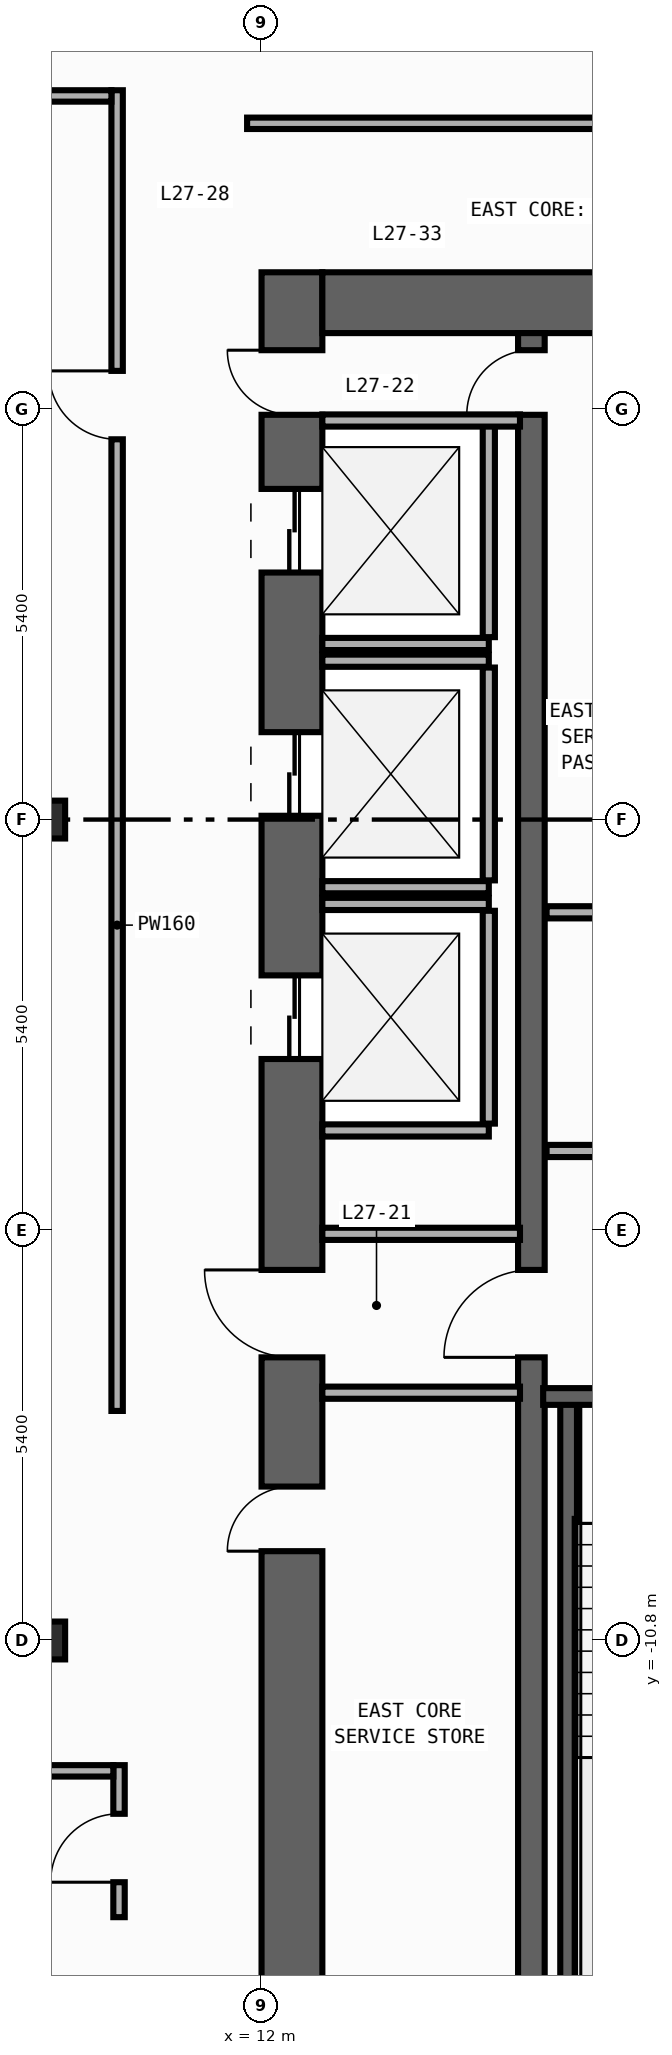
"""IFC4 building model, lengths in metres.
Left out: names, types, materials, properties, quantities, classifications, styles, units other than length and angle.
Written with IfcOpenShell. Run it as: python <this file> out.ifc"""

import sys

from ifc_helpers import new_model, si_unit, direction, frame, frame_2d, origin, origin_2d, place, context, subcontext, project, spatial, rectangle, i_section, extrude, element, fill, save


model = new_model("IFC4")
c1 = context("Model", 3, precision=1e-05, world=origin(), true_north=direction((0.0, 1.0)))
c2 = subcontext(c1, "Body", "Model", "MODEL_VIEW")
j1 = project(units=[si_unit("LENGTHUNIT", "METRE"), si_unit("PLANEANGLEUNIT", "RADIAN")], contexts=[c1])
p1 = place(None, origin())
s1 = spatial("IfcSite", under=j1, at=p1, CompositionType="ELEMENT")
p2 = place(p1, origin())
s2 = spatial("IfcBuilding", under=s1, at=p2, CompositionType="ELEMENT")
p3 = place(p2, frame((0.0, 0.0, 118.4)))
s3 = spatial("IfcBuildingStorey", under=s2, at=p3, CompositionType="ELEMENT", Elevation=118.4)
p4 = place(p3, frame((12.4, -19.8, 0.0), z_axis=(0.0, 0.0, 1.0), x_axis=(0.0, 1.0, 0.0)))
e1 = element("IfcWall", 1, at=p4, inside=s3, PredefinedType="SHEAR", context=c2, shape_type="SweptSolid", body=[
    extrude(rectangle(XDim=27.0, YDim=0.8, at=frame_2d((13.5, 0.0))), origin(), (0.0, 0.0, 1.0), 3.94),
])
p5 = place(p4, frame((23.05, 0.0, 0.0)))
e2 = element("IfcOpeningElement", 2, at=p5, cuts=e1, PredefinedType="OPENING", context=c2, shape_type="SweptSolid", body=[
    extrude(rectangle(XDim=1.1, YDim=2.2, at=frame_2d((0.55, 1.1))), frame((0.0, 0.41, 0.0), z_axis=(0.0, -1.0, 0.0), x_axis=(1.0, 0.0, 0.0)), (0.0, 0.0, 1.0), 0.82),
])
p6 = place(p4, frame((19.85, 0.0, 0.0)))
e3 = element("IfcOpeningElement", 3, at=p6, cuts=e1, PredefinedType="OPENING", context=c2, shape_type="SweptSolid", body=[
    extrude(rectangle(XDim=1.1, YDim=2.2, at=frame_2d((0.55, 1.1))), frame((0.0, 0.41, 0.0), z_axis=(0.0, -1.0, 0.0), x_axis=(1.0, 0.0, 0.0)), (0.0, 0.0, 1.0), 0.82),
])
p7 = place(p4, frame((16.65, 0.0, 0.0)))
e4 = element("IfcOpeningElement", 4, at=p7, cuts=e1, PredefinedType="OPENING", context=c2, shape_type="SweptSolid", body=[
    extrude(rectangle(XDim=1.1, YDim=2.2, at=frame_2d((0.55, 1.1))), frame((0.0, 0.41, 0.0), z_axis=(0.0, -1.0, 0.0), x_axis=(1.0, 0.0, 0.0)), (0.0, 0.0, 1.0), 0.82),
])
p8 = place(p4, frame((10.175, 0.0, 0.0)))
e5 = element("IfcOpeningElement", 5, at=p8, cuts=e1, PredefinedType="OPENING", context=c2, shape_type="SweptSolid", body=[
    extrude(rectangle(XDim=0.85, YDim=2.1, at=frame_2d((0.425, 1.05))), frame((0.0, 0.41, 0.0), z_axis=(0.0, -1.0, 0.0), x_axis=(1.0, 0.0, 0.0)), (0.0, 0.0, 1.0), 0.82),
])
p9 = place(p4, frame((12.725, 0.0, 0.0)))
e6 = element("IfcOpeningElement", 6, at=p9, cuts=e1, PredefinedType="OPENING", context=c2, shape_type="SweptSolid", body=[
    extrude(rectangle(XDim=1.15, YDim=2.2, at=frame_2d((0.575, 1.1))), frame((0.0, 0.41, 0.0), z_axis=(0.0, -1.0, 0.0), x_axis=(1.0, 0.0, 0.0)), (0.0, 0.0, 1.0), 0.82),
])
p10 = place(p4, frame((25.125, 0.0, 0.0)))
e7 = element("IfcOpeningElement", 7, at=p10, cuts=e1, PredefinedType="OPENING", context=c2, shape_type="SweptSolid", body=[
    extrude(rectangle(XDim=0.85, YDim=2.1, at=frame_2d((0.425, 1.05))), frame((0.0, 0.41, 0.0), z_axis=(0.0, -1.0, 0.0), x_axis=(1.0, 0.0, 0.0)), (0.0, 0.0, 1.0), 0.82),
])
p11 = place(p3, frame((12.8, 6.8, 0.0), z_axis=(0.0, 0.0, 1.0), x_axis=(1.0, 0.0, 0.0)))
e8 = element("IfcWall", 8, at=p11, inside=s3, PredefinedType="SHEAR", context=c2, shape_type="SweptSolid", body=[
    extrude(rectangle(XDim=6.8, YDim=0.8, at=frame_2d((3.4, 0.0))), origin(), (0.0, 0.0, 1.0), 3.94),
])
p12 = place(p3, frame((15.55, -19.0, 0.0), z_axis=(0.0, 0.0, 1.0), x_axis=(0.0, 1.0, 0.0)))
e9 = element("IfcWall", 9, at=p12, inside=s3, PredefinedType="SHEAR", context=c2, shape_type="SweptSolid", body=[
    extrude(rectangle(XDim=25.4, YDim=0.35, at=frame_2d((12.7, 0.0))), origin(), (0.0, 0.0, 1.0), 3.94),
])
p13 = place(p12, frame((11.925, 0.0, 0.0)))
e10 = element("IfcOpeningElement", 10, at=p13, cuts=e9, PredefinedType="OPENING", context=c2, shape_type="SweptSolid", body=[
    extrude(rectangle(XDim=1.15, YDim=2.2, at=frame_2d((0.575, 1.1))), frame((0.0, 0.185, 0.0), z_axis=(0.0, -1.0, 0.0), x_axis=(1.0, 0.0, 0.0)), (0.0, 0.0, 1.0), 0.37),
])
p14 = place(p12, frame((24.325, 0.0, 0.0)))
e11 = element("IfcOpeningElement", 11, at=p14, cuts=e9, PredefinedType="OPENING", context=c2, shape_type="SweptSolid", body=[
    extrude(rectangle(XDim=0.85, YDim=2.1, at=frame_2d((0.425, 1.05))), frame((0.0, 0.185, 0.0), z_axis=(0.0, -1.0, 0.0), x_axis=(1.0, 0.0, 0.0)), (0.0, 0.0, 1.0), 0.37),
])
p15 = place(p3, frame((16.04, -18.89, 0.0), z_axis=(0.0, 0.0, 1.0), x_axis=(0.0, 1.0, 0.0)))
e12 = element("IfcWall", 12, at=p15, inside=s3, PredefinedType="SHEAR", context=c2, shape_type="SweptSolid", body=[
    extrude(rectangle(XDim=11.3, YDim=0.22, at=frame_2d((5.65, 0.0))), origin(), (0.0, 0.0, 1.0), 3.94),
])
p16 = place(p3, frame((19.62, -7.59, 0.0), z_axis=(0.0, 0.0, 1.0), x_axis=(-1.0, 0.0, 0.0)))
e13 = element("IfcWall", 13, at=p16, inside=s3, PredefinedType="SHEAR", context=c2, shape_type="SweptSolid", body=[
    extrude(rectangle(XDim=3.915, YDim=0.22, at=frame_2d((1.958, 0.0))), origin(), (0.0, 0.0, 1.0), 3.94),
])
p17 = place(p16, frame((1.08, 0.0, 0.0)))
e14 = element("IfcOpeningElement", 14, at=p17, cuts=e13, PredefinedType="OPENING", context=c2, shape_type="SweptSolid", body=[
    extrude(rectangle(XDim=1.1, YDim=2.2, at=frame_2d((0.55, 1.1))), frame((0.0, 0.12, 0.0), z_axis=(0.0, -1.0, 0.0), x_axis=(1.0, 0.0, 0.0)), (0.0, 0.0, 1.0), 0.24),
])
for number, where, z_axis, x_axis in (
    (15, (9.2, -10.8, 0.0), (0.0, 0.0, 1.0), (1.0, 0.0, 0.0)),
    (16, (9.2, 0.0, 0.0), (0.0, 0.0, 1.0), (1.0, 0.0, 0.0)),
):
    element("IfcColumn", number, at=place(p3, frame(where, z_axis=z_axis, x_axis=x_axis)), inside=s3, PredefinedType="COLUMN", context=c2, shape_type="SweptSolid", body=[
        extrude(i_section(OverallWidth=0.432, OverallDepth=0.498, WebThickness=0.045, FlangeThickness=0.07, FilletRadius=0.022, at=origin_2d()), origin(), (0.0, 0.0, 1.0), 4.2),
    ])
p18 = place(p3, frame((12.8, 2.31, 0.0), z_axis=(0.0, 0.0, 1.0), x_axis=(1.0, 0.0, 0.0)))
e17 = element("IfcWall", 17, at=p18, inside=s3, PredefinedType="STANDARD", context=c2, shape_type="SweptSolid", body=[
    extrude(rectangle(XDim=2.19, YDim=0.16, at=frame_2d((1.095, 0.0))), origin(), (0.0, 0.0, 1.0), 3.94),
])
p19 = place(p3, frame((14.99, 2.4, 0.0), z_axis=(0.0, 0.0, 1.0), x_axis=(0.0, 1.0, 0.0)))
e18 = element("IfcWall", 18, at=p19, inside=s3, PredefinedType="STANDARD", context=c2, shape_type="SweptSolid", body=[
    extrude(rectangle(XDim=2.8, YDim=0.16, at=frame_2d((1.4, 0.0))), origin(), (0.0, 0.0, 1.0), 3.94),
])
for number, where, z_axis, x_axis in (
    (19, (12.8, -0.89, 0.0), (0.0, 0.0, 1.0), (1.0, 0.0, 0.0)),
    (20, (12.8, 2.09, 0.0), (0.0, 0.0, 1.0), (1.0, 0.0, 0.0)),
):
    element("IfcWall", number, at=place(p3, frame(where, z_axis=z_axis, x_axis=x_axis)), inside=s3, PredefinedType="STANDARD", context=c2, shape_type="SweptSolid", body=[
        extrude(rectangle(XDim=2.19, YDim=0.16, at=frame_2d((1.095, 0.0))), origin(), (0.0, 0.0, 1.0), 3.94),
    ])
p20 = place(p3, frame((14.99, -0.8, 0.0), z_axis=(0.0, 0.0, 1.0), x_axis=(0.0, 1.0, 0.0)))
e21 = element("IfcWall", 21, at=p20, inside=s3, PredefinedType="STANDARD", context=c2, shape_type="SweptSolid", body=[
    extrude(rectangle(XDim=2.8, YDim=0.16, at=frame_2d((1.4, 0.0))), origin(), (0.0, 0.0, 1.0), 3.94),
])
for number, where, z_axis, x_axis in (
    (22, (12.8, -4.09, 0.0), (0.0, 0.0, 1.0), (1.0, 0.0, 0.0)),
    (23, (12.8, -1.11, 0.0), (0.0, 0.0, 1.0), (1.0, 0.0, 0.0)),
):
    element("IfcWall", number, at=place(p3, frame(where, z_axis=z_axis, x_axis=x_axis)), inside=s3, PredefinedType="STANDARD", context=c2, shape_type="SweptSolid", body=[
        extrude(rectangle(XDim=2.19, YDim=0.16, at=frame_2d((1.095, 0.0))), origin(), (0.0, 0.0, 1.0), 3.94),
    ])
p21 = place(p3, frame((14.99, -4.0, 0.0), z_axis=(0.0, 0.0, 1.0), x_axis=(0.0, 1.0, 0.0)))
e24 = element("IfcWall", 24, at=p21, inside=s3, PredefinedType="STANDARD", context=c2, shape_type="SweptSolid", body=[
    extrude(rectangle(XDim=2.8, YDim=0.16, at=frame_2d((1.4, 0.0))), origin(), (0.0, 0.0, 1.0), 3.94),
])
p22 = place(p3, frame((15.75, -4.36, 0.0), z_axis=(0.0, 0.0, 1.0), x_axis=(1.0, 0.0, 0.0)))
e25 = element("IfcWall", 25, at=p22, inside=s3, PredefinedType="STANDARD", context=c2, shape_type="SweptSolid", body=[
    extrude(rectangle(XDim=3.8, YDim=0.16, at=frame_2d((1.9, 0.0))), origin(), (0.0, 0.0, 1.0), 3.94),
])
p23 = place(p22, frame((1.47, 0.0, 0.0)))
e26 = element("IfcOpeningElement", 26, at=p23, cuts=e25, PredefinedType="OPENING", context=c2, shape_type="SweptSolid", body=[
    extrude(rectangle(XDim=1.15, YDim=2.2, at=frame_2d((0.575, 1.1))), frame((0.0, 0.09, 0.0), z_axis=(0.0, -1.0, 0.0), x_axis=(1.0, 0.0, 0.0)), (0.0, 0.0, 1.0), 0.18),
])
p24 = place(p3, frame((15.75, -1.22, 0.0), z_axis=(0.0, 0.0, 1.0), x_axis=(1.0, 0.0, 0.0)))
e27 = element("IfcWall", 27, at=p24, inside=s3, PredefinedType="STANDARD", context=c2, shape_type="SweptSolid", body=[
    extrude(rectangle(XDim=3.8, YDim=0.16, at=frame_2d((1.9, 0.0))), origin(), (0.0, 0.0, 1.0), 3.94),
])
for number, where, z_axis, x_axis in (
    (28, (12.8, -5.45, 0.0), (0.0, 0.0, 1.0), (1.0, 0.0, 0.0)),
    (29, (12.8, -7.54, 0.0), (0.0, 0.0, 1.0), (1.0, 0.0, 0.0)),
    (30, (12.8, 5.25, 0.0), (0.0, 0.0, 1.0), (1.0, 0.0, 0.0)),
):
    element("IfcWall", number, at=place(p3, frame(where, z_axis=z_axis, x_axis=x_axis)), inside=s3, PredefinedType="STANDARD", context=c2, shape_type="SweptSolid", body=[
        extrude(rectangle(XDim=2.6, YDim=0.16, at=frame_2d((1.3, 0.0))), origin(), (0.0, 0.0, 1.0), 3.94),
    ])
p25 = place(p3, frame((10.1, -7.78, 0.0), z_axis=(0.0, 0.0, 1.0), x_axis=(0.0, 1.0, 0.0)))
e31 = element("IfcWall", 31, at=p25, inside=s3, PredefinedType="PARTITIONING", context=c2, shape_type="SweptSolid", body=[
    extrude(rectangle(XDim=17.375, YDim=0.15, at=frame_2d((8.688, 0.0))), origin(), (0.0, 0.0, 1.0), 3.94),
])
p26 = place(p25, frame((12.783, 0.0, 0.0)))
e32 = element("IfcOpeningElement", 32, at=p26, cuts=e31, PredefinedType="OPENING", context=c2, shape_type="SweptSolid", body=[
    extrude(rectangle(XDim=0.9, YDim=2.15, at=frame_2d((0.45, 1.075))), frame((0.0, 0.085, 0.0), z_axis=(0.0, -1.0, 0.0), x_axis=(1.0, 0.0, 0.0)), (0.0, 0.0, 1.0), 0.17),
])
p27 = place(p3, frame((10.125, -14.44, 0.0), z_axis=(0.0, 0.0, 1.0), x_axis=(0.0, 1.0, 0.0)))
e33 = element("IfcWall", 33, at=p27, inside=s3, PredefinedType="PARTITIONING", context=c2, shape_type="SweptSolid", body=[
    extrude(rectangle(XDim=2.0, YDim=0.15, at=frame_2d((1.0, 0.0))), origin(), (0.0, 0.0, 1.0), 3.94),
])
p28 = place(p27, frame((0.46, 0.0, 0.0)))
e34 = element("IfcOpeningElement", 34, at=p28, cuts=e33, PredefinedType="OPENING", context=c2, shape_type="SweptSolid", body=[
    extrude(rectangle(XDim=0.9, YDim=2.15, at=frame_2d((0.45, 1.075))), frame((0.0, 0.085, 0.0), z_axis=(0.0, -1.0, 0.0), x_axis=(1.0, 0.0, 0.0)), (0.0, 0.0, 1.0), 0.17),
])
p29 = place(p3, frame((-4.82, 9.52, 0.0), z_axis=(0.0, 0.0, 1.0), x_axis=(1.0, 0.0, 0.0)))
e35 = element("IfcWall", 35, at=p29, inside=s3, PredefinedType="PARTITIONING", context=c2, shape_type="SweptSolid", body=[
    extrude(rectangle(XDim=14.845, YDim=0.15, at=frame_2d((7.422, 0.0))), origin(), (0.0, 0.0, 1.0), 3.94),
])
p30 = place(p29, frame((3.866, 0.0, 0.0)))
e36 = element("IfcOpeningElement", 36, at=p30, cuts=e35, PredefinedType="OPENING", context=c2, shape_type="SweptSolid", body=[
    extrude(rectangle(XDim=0.9, YDim=2.15, at=frame_2d((0.45, 1.075))), frame((0.0, 0.085, 0.0), z_axis=(0.0, -1.0, 0.0), x_axis=(1.0, 0.0, 0.0)), (0.0, 0.0, 1.0), 0.17),
])
p31 = place(p3, frame((-0.015, -12.515, 0.0), z_axis=(0.0, 0.0, 1.0), x_axis=(1.0, 0.0, 0.0)))
e37 = element("IfcWall", 37, at=p31, inside=s3, PredefinedType="PARTITIONING", context=c2, shape_type="SweptSolid", body=[
    extrude(rectangle(XDim=10.065, YDim=0.15, at=frame_2d((5.032, 0.0))), origin(), (0.0, 0.0, 1.0), 3.94),
])
p32 = place(p31, frame((1.868, 0.0, 0.0)))
e38 = element("IfcOpeningElement", 38, at=p32, cuts=e37, PredefinedType="OPENING", context=c2, shape_type="SweptSolid", body=[
    extrude(rectangle(XDim=0.9, YDim=2.15, at=frame_2d((0.45, 1.075))), frame((0.0, 0.085, 0.0), z_axis=(0.0, -1.0, 0.0), x_axis=(1.0, 0.0, 0.0)), (0.0, 0.0, 1.0), 0.17),
])
p33 = place(p3, frame((11.81, 9.16, 0.0), z_axis=(0.0, 0.0, 1.0), x_axis=(1.0, 0.0, 0.0)))
e39 = element("IfcWall", 39, at=p33, inside=s3, PredefinedType="PARTITIONING", context=c2, shape_type="SweptSolid", body=[
    extrude(rectangle(XDim=8.83, YDim=0.15, at=frame_2d((4.415, 0.0))), origin(), (0.0, 0.0, 1.0), 3.94),
])
p34 = place(p33, frame((5.067, 0.0, 0.0)))
e40 = element("IfcOpeningElement", 40, at=p34, cuts=e39, PredefinedType="OPENING", context=c2, shape_type="SweptSolid", body=[
    extrude(rectangle(XDim=0.9, YDim=2.15, at=frame_2d((0.45, 1.075))), frame((0.0, 0.085, 0.0), z_axis=(0.0, -1.0, 0.0), x_axis=(1.0, 0.0, 0.0)), (0.0, 0.0, 1.0), 0.17),
])
p35 = place(p5, origin())
e41 = element("IfcDoor", 41, at=p35, inside=s3, OperationType="DOUBLE_DOOR_SLIDING", PredefinedType="DOOR", context=c2, shape_type="SweptSolid", body=[
    extrude(rectangle(XDim=1.1, YDim=2.2, at=frame_2d((0.55, 1.1))), frame((0.0, 0.025, 0.0), z_axis=(0.0, -1.0, 0.0), x_axis=(1.0, 0.0, 0.0)), (0.0, 0.0, 1.0), 0.05),
])
fill(e2, e41)
p36 = place(p6, origin())
e42 = element("IfcDoor", 42, at=p36, inside=s3, OperationType="DOUBLE_DOOR_SLIDING", PredefinedType="DOOR", context=c2, shape_type="SweptSolid", body=[
    extrude(rectangle(XDim=1.1, YDim=2.2, at=frame_2d((0.55, 1.1))), frame((0.0, 0.025, 0.0), z_axis=(0.0, -1.0, 0.0), x_axis=(1.0, 0.0, 0.0)), (0.0, 0.0, 1.0), 0.05),
])
fill(e3, e42)
p37 = place(p7, origin())
e43 = element("IfcDoor", 43, at=p37, inside=s3, OperationType="DOUBLE_DOOR_SLIDING", PredefinedType="DOOR", context=c2, shape_type="SweptSolid", body=[
    extrude(rectangle(XDim=1.1, YDim=2.2, at=frame_2d((0.55, 1.1))), frame((0.0, 0.025, 0.0), z_axis=(0.0, -1.0, 0.0), x_axis=(1.0, 0.0, 0.0)), (0.0, 0.0, 1.0), 0.05),
])
fill(e4, e43)
p38 = place(p8, origin())
e44 = element("IfcDoor", 44, at=p38, inside=s3, OperationType="SINGLE_SWING_LEFT", PredefinedType="DOOR", context=c2, shape_type="SweptSolid", body=[
    extrude(rectangle(XDim=0.85, YDim=2.1, at=frame_2d((0.425, 1.05))), frame((0.0, 0.025, 0.0), z_axis=(0.0, -1.0, 0.0), x_axis=(1.0, 0.0, 0.0)), (0.0, 0.0, 1.0), 0.05),
])
fill(e5, e44)
p39 = place(p9, origin())
e45 = element("IfcDoor", 45, at=p39, inside=s3, OperationType="SINGLE_SWING_RIGHT", PredefinedType="DOOR", context=c2, shape_type="SweptSolid", body=[
    extrude(rectangle(XDim=1.15, YDim=2.2, at=frame_2d((0.575, 1.1))), frame((0.0, 0.025, 0.0), z_axis=(0.0, -1.0, 0.0), x_axis=(1.0, 0.0, 0.0)), (0.0, 0.0, 1.0), 0.05),
])
fill(e6, e45)
p40 = place(p13, origin())
e46 = element("IfcDoor", 46, at=p40, inside=s3, OperationType="SINGLE_SWING_LEFT", PredefinedType="DOOR", context=c2, shape_type="SweptSolid", body=[
    extrude(rectangle(XDim=1.15, YDim=2.2, at=frame_2d((0.575, 1.1))), frame((0.0, 0.025, 0.0), z_axis=(0.0, -1.0, 0.0), x_axis=(1.0, 0.0, 0.0)), (0.0, 0.0, 1.0), 0.05),
])
fill(e10, e46)
p41 = place(p10, origin())
e47 = element("IfcDoor", 47, at=p41, inside=s3, OperationType="SINGLE_SWING_RIGHT", PredefinedType="DOOR", context=c2, shape_type="SweptSolid", body=[
    extrude(rectangle(XDim=0.85, YDim=2.1, at=frame_2d((0.425, 1.05))), frame((0.0, 0.025, 0.0), z_axis=(0.0, -1.0, 0.0), x_axis=(1.0, 0.0, 0.0)), (0.0, 0.0, 1.0), 0.05),
])
fill(e7, e47)
p42 = place(p14, origin())
e48 = element("IfcDoor", 48, at=p42, inside=s3, OperationType="SINGLE_SWING_LEFT", PredefinedType="DOOR", context=c2, shape_type="SweptSolid", body=[
    extrude(rectangle(XDim=0.85, YDim=2.1, at=frame_2d((0.425, 1.05))), frame((0.0, 0.025, 0.0), z_axis=(0.0, -1.0, 0.0), x_axis=(1.0, 0.0, 0.0)), (0.0, 0.0, 1.0), 0.05),
])
fill(e11, e48)
p43 = place(p26, origin())
e49 = element("IfcDoor", 49, at=p43, inside=s3, OperationType="SINGLE_SWING_RIGHT", PredefinedType="DOOR", context=c2, shape_type="SweptSolid", body=[
    extrude(rectangle(XDim=0.9, YDim=2.15, at=frame_2d((0.45, 1.075))), frame((0.0, 0.025, 0.0), z_axis=(0.0, -1.0, 0.0), x_axis=(1.0, 0.0, 0.0)), (0.0, 0.0, 1.0), 0.05),
])
fill(e32, e49)
p44 = place(p28, origin())
e50 = element("IfcDoor", 50, at=p44, inside=s3, OperationType="SINGLE_SWING_LEFT", PredefinedType="DOOR", context=c2, shape_type="SweptSolid", body=[
    extrude(rectangle(XDim=0.9, YDim=2.15, at=frame_2d((0.45, 1.075))), frame((0.0, 0.025, 0.0), z_axis=(0.0, -1.0, 0.0), x_axis=(1.0, 0.0, 0.0)), (0.0, 0.0, 1.0), 0.05),
])
fill(e34, e50)
save(model, sys.argv[1])
